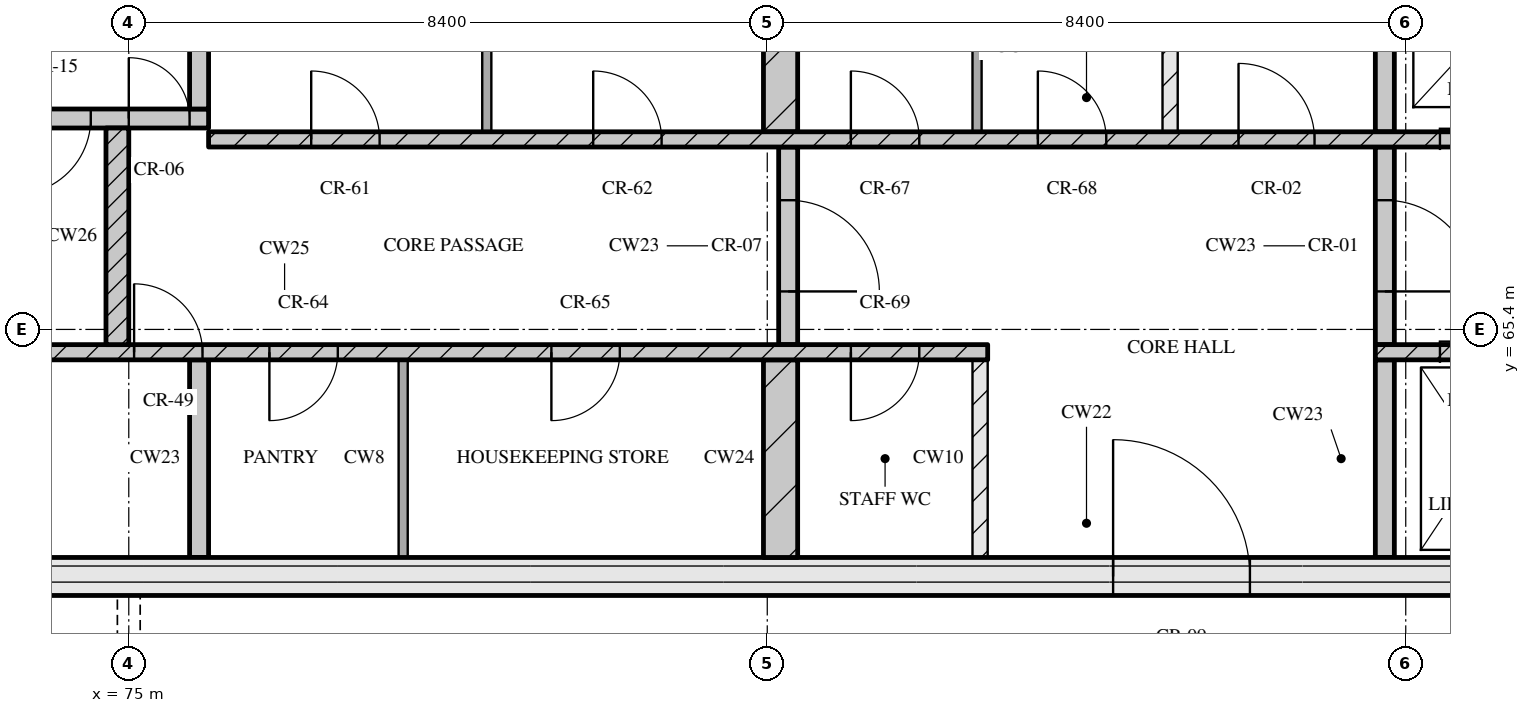
"""IFC4 building model, lengths in metres.
Left out: names, types, materials, properties, quantities, classifications, styles, units other than length and angle.
Written with IfcOpenShell. Run it as: python <this file> out.ifc"""

import sys

from ifc_helpers import new_model, si_unit, direction, frame, frame_2d, origin, place, context, subcontext, project, spatial, rectangle, extrude, element, fill, save


model = new_model("IFC4")
c1 = context("Model", 3, precision=1e-05, world=origin(), true_north=direction((0.0, 1.0)))
c2 = subcontext(c1, "Body", "Model", "MODEL_VIEW")
j1 = project(units=[si_unit("LENGTHUNIT", "METRE"), si_unit("PLANEANGLEUNIT", "RADIAN")], contexts=[c1])
p1 = place(None, origin())
s1 = spatial("IfcSite", under=j1, at=p1, CompositionType="ELEMENT")
p2 = place(p1, origin())
s2 = spatial("IfcBuilding", under=s1, at=p2, CompositionType="ELEMENT")
p3 = place(p2, frame((0.0, 0.0, 277.95)))
s3 = spatial("IfcBuildingStorey", under=s2, at=p3, CompositionType="ELEMENT", Elevation=277.95)
p4 = place(p3, frame((67.3, 62.15, 0.0), z_axis=(0.0, 0.0, 1.0), x_axis=(1.0, 0.0, 0.0)))
e1 = element("IfcWall", 1, at=p4, inside=s3, PredefinedType="SOLIDWALL", context=c2, shape_type="SweptSolid", body=[
    extrude(rectangle(XDim=40.6, YDim=0.5, at=frame_2d((20.3, 0.0))), origin(), (0.0, 0.0, 1.0), 3.32),
])
p5 = place(p4, frame((20.65, 0.0, 0.0)))
e2 = element("IfcOpeningElement", 2, at=p5, cuts=e1, PredefinedType="OPENING", context=c2, shape_type="SweptSolid", body=[
    extrude(rectangle(XDim=1.8, YDim=2.1, at=frame_2d((0.9, 1.05))), frame((0.0, 0.26, 0.0), z_axis=(0.0, -1.0, 0.0), x_axis=(1.0, 0.0, 0.0)), (0.0, 0.0, 1.0), 0.52),
])
p6 = place(p3, frame((75.925, 62.4, 0.0), z_axis=(0.0, 0.0, 1.0), x_axis=(0.0, 1.0, 0.0)))
e3 = element("IfcWall", 3, at=p6, inside=s3, PredefinedType="SOLIDWALL", context=c2, shape_type="SweptSolid", body=[
    extrude(rectangle(XDim=2.6, YDim=0.25, at=frame_2d((1.3, 0.0))), origin(), (0.0, 0.0, 1.0), 3.32),
])
p7 = place(p3, frame((78.61, 62.4, 0.0), z_axis=(0.0, 0.0, 1.0), x_axis=(0.0, 1.0, 0.0)))
e4 = element("IfcWall", 4, at=p7, inside=s3, PredefinedType="PARTITIONING", context=c2, shape_type="SweptSolid", body=[
    extrude(rectangle(XDim=2.6, YDim=0.12, at=frame_2d((1.3, 0.0))), origin(), (0.0, 0.0, 1.0), 3.32),
])
p8 = place(p3, frame((83.575, 62.4, 0.0), z_axis=(0.0, 0.0, 1.0), x_axis=(0.0, 1.0, 0.0)))
e5 = element("IfcWall", 5, at=p8, inside=s3, PredefinedType="SOLIDWALL", context=c2, shape_type="SweptSolid", body=[
    extrude(rectangle(XDim=2.6, YDim=0.45, at=frame_2d((1.3, 0.0))), origin(), (0.0, 0.0, 1.0), 3.32),
])
p9 = place(p3, frame((86.2, 62.4, 0.0), z_axis=(0.0, 0.0, 1.0), x_axis=(0.0, 1.0, 0.0)))
e6 = element("IfcWall", 6, at=p9, inside=s3, PredefinedType="PARTITIONING", context=c2, shape_type="SweptSolid", body=[
    extrude(rectangle(XDim=2.6, YDim=0.2, at=frame_2d((1.3, 0.0))), origin(), (0.0, 0.0, 1.0), 3.32),
])
p10 = place(p3, frame((91.525, 62.4, 0.0), z_axis=(0.0, 0.0, 1.0), x_axis=(0.0, 1.0, 0.0)))
e7 = element("IfcWall", 7, at=p10, inside=s3, PredefinedType="SOLIDWALL", context=c2, shape_type="SweptSolid", body=[
    extrude(rectangle(XDim=2.6, YDim=0.25, at=frame_2d((1.3, 0.0))), origin(), (0.0, 0.0, 1.0), 3.32),
])
p11 = place(p3, frame((67.8, 65.1, 0.0), z_axis=(0.0, 0.0, 1.0), x_axis=(1.0, 0.0, 0.0)))
e8 = element("IfcWall", 8, at=p11, inside=s3, PredefinedType="SOLIDWALL", context=c2, shape_type="SweptSolid", body=[
    extrude(rectangle(XDim=18.5, YDim=0.2, at=frame_2d((9.25, 0.0))), origin(), (0.0, 0.0, 1.0), 3.32),
])
p12 = place(p11, frame((7.27, 0.0, 0.0)))
e9 = element("IfcOpeningElement", 9, at=p12, cuts=e8, PredefinedType="OPENING", context=c2, shape_type="SweptSolid", body=[
    extrude(rectangle(XDim=0.9, YDim=2.1, at=frame_2d((0.45, 1.05))), frame((0.0, 0.11, 0.0), z_axis=(0.0, -1.0, 0.0), x_axis=(1.0, 0.0, 0.0)), (0.0, 0.0, 1.0), 0.22),
])
p13 = place(p11, frame((9.05, 0.0, 0.0)))
e10 = element("IfcOpeningElement", 10, at=p13, cuts=e8, PredefinedType="OPENING", context=c2, shape_type="SweptSolid", body=[
    extrude(rectangle(XDim=0.9, YDim=2.1, at=frame_2d((0.45, 1.05))), frame((0.0, 0.11, 0.0), z_axis=(0.0, -1.0, 0.0), x_axis=(1.0, 0.0, 0.0)), (0.0, 0.0, 1.0), 0.22),
])
p14 = place(p11, frame((12.76, 0.0, 0.0)))
e11 = element("IfcOpeningElement", 11, at=p14, cuts=e8, PredefinedType="OPENING", context=c2, shape_type="SweptSolid", body=[
    extrude(rectangle(XDim=0.9, YDim=2.1, at=frame_2d((0.45, 1.05))), frame((0.0, 0.11, 0.0), z_axis=(0.0, -1.0, 0.0), x_axis=(1.0, 0.0, 0.0)), (0.0, 0.0, 1.0), 0.22),
])
p15 = place(p11, frame((16.7, 0.0, 0.0)))
e12 = element("IfcOpeningElement", 12, at=p15, cuts=e8, PredefinedType="OPENING", context=c2, shape_type="SweptSolid", body=[
    extrude(rectangle(XDim=0.9, YDim=2.1, at=frame_2d((0.45, 1.05))), frame((0.0, 0.11, 0.0), z_axis=(0.0, -1.0, 0.0), x_axis=(1.0, 0.0, 0.0)), (0.0, 0.0, 1.0), 0.22),
])
p16 = place(p3, frame((91.4, 65.1, 0.0), z_axis=(0.0, 0.0, 1.0), x_axis=(1.0, 0.0, 0.0)))
e13 = element("IfcWall", 13, at=p16, inside=s3, PredefinedType="SOLIDWALL", context=c2, shape_type="SweptSolid", body=[
    extrude(rectangle(XDim=16.0, YDim=0.2, at=frame_2d((8.0, 0.0))), origin(), (0.0, 0.0, 1.0), 3.32),
])
p17 = place(p16, frame((0.85, 0.0, 0.0)))
e14 = element("IfcOpeningElement", 14, at=p17, cuts=e13, PredefinedType="OPENING", context=c2, shape_type="SweptSolid", body=[
    extrude(rectangle(XDim=1.1, YDim=2.1, at=frame_2d((0.55, 1.05))), frame((0.0, 0.11, 0.0), z_axis=(0.0, -1.0, 0.0), x_axis=(1.0, 0.0, 0.0)), (0.0, 0.0, 1.0), 0.22),
])
p18 = place(p16, frame((3.35, 0.0, 0.0)))
e15 = element("IfcOpeningElement", 15, at=p18, cuts=e13, PredefinedType="OPENING", context=c2, shape_type="SweptSolid", body=[
    extrude(rectangle(XDim=1.1, YDim=2.1, at=frame_2d((0.55, 1.05))), frame((0.0, 0.11, 0.0), z_axis=(0.0, -1.0, 0.0), x_axis=(1.0, 0.0, 0.0)), (0.0, 0.0, 1.0), 0.22),
])
p19 = place(p16, frame((5.85, 0.0, 0.0)))
e16 = element("IfcOpeningElement", 16, at=p19, cuts=e13, PredefinedType="OPENING", context=c2, shape_type="SweptSolid", body=[
    extrude(rectangle(XDim=1.1, YDim=2.1, at=frame_2d((0.55, 1.05))), frame((0.0, 0.11, 0.0), z_axis=(0.0, -1.0, 0.0), x_axis=(1.0, 0.0, 0.0)), (0.0, 0.0, 1.0), 0.22),
])
p20 = place(p16, frame((7.83, 0.0, 0.0)))
e17 = element("IfcOpeningElement", 17, at=p20, cuts=e13, PredefinedType="OPENING", context=c2, shape_type="SweptSolid", body=[
    extrude(rectangle(XDim=0.9, YDim=2.1, at=frame_2d((0.45, 1.05))), frame((0.0, 0.11, 0.0), z_axis=(0.0, -1.0, 0.0), x_axis=(1.0, 0.0, 0.0)), (0.0, 0.0, 1.0), 0.22),
])
p21 = place(p3, frame((74.85, 65.2, 0.0), z_axis=(0.0, 0.0, 1.0), x_axis=(0.0, 1.0, 0.0)))
e18 = element("IfcWall", 18, at=p21, inside=s3, PredefinedType="SOLIDWALL", context=c2, shape_type="SweptSolid", body=[
    extrude(rectangle(XDim=2.85, YDim=0.3, at=frame_2d((1.425, 0.0))), origin(), (0.0, 0.0, 1.0), 3.32),
])
p22 = place(p3, frame((83.675, 65.2, 0.0), z_axis=(0.0, 0.0, 1.0), x_axis=(0.0, 1.0, 0.0)))
e19 = element("IfcWall", 19, at=p22, inside=s3, PredefinedType="SOLIDWALL", context=c2, shape_type="SweptSolid", body=[
    extrude(rectangle(XDim=2.6, YDim=0.25, at=frame_2d((1.3, 0.0))), origin(), (0.0, 0.0, 1.0), 3.32),
])
p23 = place(p22, frame((0.7, 0.0, 0.0)))
e20 = element("IfcOpeningElement", 20, at=p23, cuts=e19, PredefinedType="OPENING", context=c2, shape_type="SweptSolid", body=[
    extrude(rectangle(XDim=1.2, YDim=2.1, at=frame_2d((0.6, 1.05))), frame((0.0, 0.135, 0.0), z_axis=(0.0, -1.0, 0.0), x_axis=(1.0, 0.0, 0.0)), (0.0, 0.0, 1.0), 0.27),
])
p24 = place(p3, frame((91.525, 65.2, 0.0), z_axis=(0.0, 0.0, 1.0), x_axis=(0.0, 1.0, 0.0)))
e21 = element("IfcWall", 21, at=p24, inside=s3, PredefinedType="SOLIDWALL", context=c2, shape_type="SweptSolid", body=[
    extrude(rectangle(XDim=2.6, YDim=0.25, at=frame_2d((1.3, 0.0))), origin(), (0.0, 0.0, 1.0), 3.32),
])
p25 = place(p24, frame((0.7, 0.0, 0.0)))
e22 = element("IfcOpeningElement", 22, at=p25, cuts=e21, PredefinedType="OPENING", context=c2, shape_type="SweptSolid", body=[
    extrude(rectangle(XDim=1.2, YDim=2.1, at=frame_2d((0.6, 1.05))), frame((0.0, 0.135, 0.0), z_axis=(0.0, -1.0, 0.0), x_axis=(1.0, 0.0, 0.0)), (0.0, 0.0, 1.0), 0.27),
])
p26 = place(p3, frame((76.05, 67.9, 0.0), z_axis=(0.0, 0.0, 1.0), x_axis=(1.0, 0.0, 0.0)))
e23 = element("IfcWall", 23, at=p26, inside=s3, PredefinedType="SOLIDWALL", context=c2, shape_type="SweptSolid", body=[
    extrude(rectangle(XDim=23.1, YDim=0.2, at=frame_2d((11.55, 0.0))), origin(), (0.0, 0.0, 1.0), 3.32),
])
p27 = place(p26, frame((1.35, 0.0, 0.0)))
e24 = element("IfcOpeningElement", 24, at=p27, cuts=e23, PredefinedType="OPENING", context=c2, shape_type="SweptSolid", body=[
    extrude(rectangle(XDim=0.9, YDim=2.1, at=frame_2d((0.45, 1.05))), frame((0.0, 0.11, 0.0), z_axis=(0.0, -1.0, 0.0), x_axis=(1.0, 0.0, 0.0)), (0.0, 0.0, 1.0), 0.22),
])
p28 = place(p26, frame((5.06, 0.0, 0.0)))
e25 = element("IfcOpeningElement", 25, at=p28, cuts=e23, PredefinedType="OPENING", context=c2, shape_type="SweptSolid", body=[
    extrude(rectangle(XDim=0.9, YDim=2.1, at=frame_2d((0.45, 1.05))), frame((0.0, 0.11, 0.0), z_axis=(0.0, -1.0, 0.0), x_axis=(1.0, 0.0, 0.0)), (0.0, 0.0, 1.0), 0.22),
])
p29 = place(p26, frame((8.45, 0.0, 0.0)))
e26 = element("IfcOpeningElement", 26, at=p29, cuts=e23, PredefinedType="OPENING", context=c2, shape_type="SweptSolid", body=[
    extrude(rectangle(XDim=0.9, YDim=2.1, at=frame_2d((0.45, 1.05))), frame((0.0, 0.11, 0.0), z_axis=(0.0, -1.0, 0.0), x_axis=(1.0, 0.0, 0.0)), (0.0, 0.0, 1.0), 0.22),
])
p30 = place(p26, frame((10.91, 0.0, 0.0)))
e27 = element("IfcOpeningElement", 27, at=p30, cuts=e23, PredefinedType="OPENING", context=c2, shape_type="SweptSolid", body=[
    extrude(rectangle(XDim=0.9, YDim=2.1, at=frame_2d((0.45, 1.05))), frame((0.0, 0.11, 0.0), z_axis=(0.0, -1.0, 0.0), x_axis=(1.0, 0.0, 0.0)), (0.0, 0.0, 1.0), 0.22),
])
p31 = place(p26, frame((13.55, 0.0, 0.0)))
e28 = element("IfcOpeningElement", 28, at=p31, cuts=e23, PredefinedType="OPENING", context=c2, shape_type="SweptSolid", body=[
    extrude(rectangle(XDim=1.0, YDim=2.1, at=frame_2d((0.5, 1.05))), frame((0.0, 0.11, 0.0), z_axis=(0.0, -1.0, 0.0), x_axis=(1.0, 0.0, 0.0)), (0.0, 0.0, 1.0), 0.22),
])
p32 = place(p26, frame((16.2, 0.0, 0.0)))
e29 = element("IfcOpeningElement", 29, at=p32, cuts=e23, PredefinedType="OPENING", context=c2, shape_type="SweptSolid", body=[
    extrude(rectangle(XDim=1.1, YDim=2.1, at=frame_2d((0.55, 1.05))), frame((0.0, 0.11, 0.0), z_axis=(0.0, -1.0, 0.0), x_axis=(1.0, 0.0, 0.0)), (0.0, 0.0, 1.0), 0.22),
])
p33 = place(p26, frame((18.7, 0.0, 0.0)))
e30 = element("IfcOpeningElement", 30, at=p33, cuts=e23, PredefinedType="OPENING", context=c2, shape_type="SweptSolid", body=[
    extrude(rectangle(XDim=1.1, YDim=2.1, at=frame_2d((0.55, 1.05))), frame((0.0, 0.11, 0.0), z_axis=(0.0, -1.0, 0.0), x_axis=(1.0, 0.0, 0.0)), (0.0, 0.0, 1.0), 0.22),
])
p34 = place(p26, frame((21.2, 0.0, 0.0)))
e31 = element("IfcOpeningElement", 31, at=p34, cuts=e23, PredefinedType="OPENING", context=c2, shape_type="SweptSolid", body=[
    extrude(rectangle(XDim=1.1, YDim=2.1, at=frame_2d((0.55, 1.05))), frame((0.0, 0.11, 0.0), z_axis=(0.0, -1.0, 0.0), x_axis=(1.0, 0.0, 0.0)), (0.0, 0.0, 1.0), 0.22),
])
p35 = place(p3, frame((79.71, 68.0, 0.0), z_axis=(0.0, 0.0, 1.0), x_axis=(0.0, 1.0, 0.0)))
e32 = element("IfcWall", 32, at=p35, inside=s3, PredefinedType="PARTITIONING", context=c2, shape_type="SweptSolid", body=[
    extrude(rectangle(XDim=2.6, YDim=0.12, at=frame_2d((1.3, 0.0))), origin(), (0.0, 0.0, 1.0), 3.32),
])
p36 = place(p3, frame((83.575, 68.0, 0.0), z_axis=(0.0, 0.0, 1.0), x_axis=(0.0, 1.0, 0.0)))
e33 = element("IfcWall", 33, at=p36, inside=s3, PredefinedType="SOLIDWALL", context=c2, shape_type="SweptSolid", body=[
    extrude(rectangle(XDim=2.6, YDim=0.45, at=frame_2d((1.3, 0.0))), origin(), (0.0, 0.0, 1.0), 3.32),
])
p37 = place(p3, frame((86.16, 68.0, 0.0), z_axis=(0.0, 0.0, 1.0), x_axis=(0.0, 1.0, 0.0)))
e34 = element("IfcWall", 34, at=p37, inside=s3, PredefinedType="PARTITIONING", context=c2, shape_type="SweptSolid", body=[
    extrude(rectangle(XDim=2.6, YDim=0.12, at=frame_2d((1.3, 0.0))), origin(), (0.0, 0.0, 1.0), 3.32),
])
p38 = place(p3, frame((88.7, 68.0, 0.0), z_axis=(0.0, 0.0, 1.0), x_axis=(0.0, 1.0, 0.0)))
e35 = element("IfcWall", 35, at=p38, inside=s3, PredefinedType="PARTITIONING", context=c2, shape_type="SweptSolid", body=[
    extrude(rectangle(XDim=2.6, YDim=0.2, at=frame_2d((1.3, 0.0))), origin(), (0.0, 0.0, 1.0), 3.32),
])
p39 = place(p3, frame((91.525, 68.0, 0.0), z_axis=(0.0, 0.0, 1.0), x_axis=(0.0, 1.0, 0.0)))
e36 = element("IfcWall", 36, at=p39, inside=s3, PredefinedType="SOLIDWALL", context=c2, shape_type="SweptSolid", body=[
    extrude(rectangle(XDim=2.6, YDim=0.25, at=frame_2d((1.3, 0.0))), origin(), (0.0, 0.0, 1.0), 3.32),
])
p40 = place(p3, frame((67.8, 68.175, 0.0), z_axis=(0.0, 0.0, 1.0), x_axis=(1.0, 0.0, 0.0)))
e37 = element("IfcWall", 37, at=p40, inside=s3, PredefinedType="SOLIDWALL", context=c2, shape_type="SweptSolid", body=[
    extrude(rectangle(XDim=8.25, YDim=0.25, at=frame_2d((4.125, 0.0))), origin(), (0.0, 0.0, 1.0), 3.32),
])
p41 = place(p40, frame((5.7, 0.0, 0.0)))
e38 = element("IfcOpeningElement", 38, at=p41, cuts=e37, PredefinedType="OPENING", context=c2, shape_type="SweptSolid", body=[
    extrude(rectangle(XDim=1.0, YDim=2.1, at=frame_2d((0.5, 1.05))), frame((0.0, 0.135, 0.0), z_axis=(0.0, -1.0, 0.0), x_axis=(1.0, 0.0, 0.0)), (0.0, 0.0, 1.0), 0.27),
])
p42 = place(p40, frame((7.2, 0.0, 0.0)))
e39 = element("IfcOpeningElement", 39, at=p42, cuts=e37, PredefinedType="OPENING", context=c2, shape_type="SweptSolid", body=[
    extrude(rectangle(XDim=0.8, YDim=2.1, at=frame_2d((0.4, 1.05))), frame((0.0, 0.135, 0.0), z_axis=(0.0, -1.0, 0.0), x_axis=(1.0, 0.0, 0.0)), (0.0, 0.0, 1.0), 0.27),
])
p43 = place(p3, frame((75.925, 68.3, 0.0), z_axis=(0.0, 0.0, 1.0), x_axis=(0.0, 1.0, 0.0)))
e40 = element("IfcWall", 40, at=p43, inside=s3, PredefinedType="SOLIDWALL", context=c2, shape_type="SweptSolid", body=[
    extrude(rectangle(XDim=2.3, YDim=0.25, at=frame_2d((1.15, 0.0))), origin(), (0.0, 0.0, 1.0), 3.32),
])
p44 = place(p5, origin())
e41 = element("IfcDoor", 41, at=p44, inside=s3, OperationType="DOUBLE_DOOR_SINGLE_SWING", PredefinedType="DOOR", context=c2, shape_type="SweptSolid", body=[
    extrude(rectangle(XDim=1.8, YDim=2.1, at=frame_2d((0.9, 1.05))), frame((0.0, 0.025, 0.0), z_axis=(0.0, -1.0, 0.0), x_axis=(1.0, 0.0, 0.0)), (0.0, 0.0, 1.0), 0.05),
])
fill(e2, e41)
p45 = place(p12, origin())
e42 = element("IfcDoor", 42, at=p45, inside=s3, OperationType="SINGLE_SWING_LEFT", PredefinedType="DOOR", context=c2, shape_type="SweptSolid", body=[
    extrude(rectangle(XDim=0.9, YDim=2.1, at=frame_2d((0.45, 1.05))), frame((0.0, 0.025, 0.0), z_axis=(0.0, -1.0, 0.0), x_axis=(1.0, 0.0, 0.0)), (0.0, 0.0, 1.0), 0.05),
])
fill(e9, e42)
p46 = place(p13, origin())
e43 = element("IfcDoor", 43, at=p46, inside=s3, OperationType="SINGLE_SWING_RIGHT", PredefinedType="DOOR", context=c2, shape_type="SweptSolid", body=[
    extrude(rectangle(XDim=0.9, YDim=2.1, at=frame_2d((0.45, 1.05))), frame((0.0, 0.025, 0.0), z_axis=(0.0, -1.0, 0.0), x_axis=(1.0, 0.0, 0.0)), (0.0, 0.0, 1.0), 0.05),
])
fill(e10, e43)
p47 = place(p14, origin())
e44 = element("IfcDoor", 44, at=p47, inside=s3, OperationType="SINGLE_SWING_RIGHT", PredefinedType="DOOR", context=c2, shape_type="SweptSolid", body=[
    extrude(rectangle(XDim=0.9, YDim=2.1, at=frame_2d((0.45, 1.05))), frame((0.0, 0.025, 0.0), z_axis=(0.0, -1.0, 0.0), x_axis=(1.0, 0.0, 0.0)), (0.0, 0.0, 1.0), 0.05),
])
fill(e11, e44)
p48 = place(p15, origin())
e45 = element("IfcDoor", 45, at=p48, inside=s3, OperationType="SINGLE_SWING_RIGHT", PredefinedType="DOOR", context=c2, shape_type="SweptSolid", body=[
    extrude(rectangle(XDim=0.9, YDim=2.1, at=frame_2d((0.45, 1.05))), frame((0.0, 0.025, 0.0), z_axis=(0.0, -1.0, 0.0), x_axis=(1.0, 0.0, 0.0)), (0.0, 0.0, 1.0), 0.05),
])
fill(e12, e45)
p49 = place(p17, origin())
e46 = element("IfcDoor", 46, at=p49, inside=s3, OperationType="SLIDING_TO_LEFT", PredefinedType="DOOR", context=c2, shape_type="SweptSolid", body=[
    extrude(rectangle(XDim=1.1, YDim=2.1, at=frame_2d((0.55, 1.05))), frame((0.0, 0.025, 0.0), z_axis=(0.0, -1.0, 0.0), x_axis=(1.0, 0.0, 0.0)), (0.0, 0.0, 1.0), 0.05),
])
fill(e14, e46)
p50 = place(p23, origin())
e47 = element("IfcDoor", 47, at=p50, inside=s3, OperationType="SINGLE_SWING_RIGHT", PredefinedType="DOOR", context=c2, shape_type="SweptSolid", body=[
    extrude(rectangle(XDim=1.2, YDim=2.1, at=frame_2d((0.6, 1.05))), frame((0.0, 0.025, 0.0), z_axis=(0.0, -1.0, 0.0), x_axis=(1.0, 0.0, 0.0)), (0.0, 0.0, 1.0), 0.05),
])
fill(e20, e47)
p51 = place(p25, origin())
e48 = element("IfcDoor", 48, at=p51, inside=s3, OperationType="SINGLE_SWING_RIGHT", PredefinedType="DOOR", context=c2, shape_type="SweptSolid", body=[
    extrude(rectangle(XDim=1.2, YDim=2.1, at=frame_2d((0.6, 1.05))), frame((0.0, 0.025, 0.0), z_axis=(0.0, -1.0, 0.0), x_axis=(1.0, 0.0, 0.0)), (0.0, 0.0, 1.0), 0.05),
])
fill(e22, e48)
p52 = place(p27, origin())
e49 = element("IfcDoor", 49, at=p52, inside=s3, OperationType="SINGLE_SWING_LEFT", PredefinedType="DOOR", context=c2, shape_type="SweptSolid", body=[
    extrude(rectangle(XDim=0.9, YDim=2.1, at=frame_2d((0.45, 1.05))), frame((0.0, 0.025, 0.0), z_axis=(0.0, -1.0, 0.0), x_axis=(1.0, 0.0, 0.0)), (0.0, 0.0, 1.0), 0.05),
])
fill(e24, e49)
p53 = place(p28, origin())
e50 = element("IfcDoor", 50, at=p53, inside=s3, OperationType="SINGLE_SWING_LEFT", PredefinedType="DOOR", context=c2, shape_type="SweptSolid", body=[
    extrude(rectangle(XDim=0.9, YDim=2.1, at=frame_2d((0.45, 1.05))), frame((0.0, 0.025, 0.0), z_axis=(0.0, -1.0, 0.0), x_axis=(1.0, 0.0, 0.0)), (0.0, 0.0, 1.0), 0.05),
])
fill(e25, e50)
p54 = place(p29, origin())
e51 = element("IfcDoor", 51, at=p54, inside=s3, OperationType="SINGLE_SWING_LEFT", PredefinedType="DOOR", context=c2, shape_type="SweptSolid", body=[
    extrude(rectangle(XDim=0.9, YDim=2.1, at=frame_2d((0.45, 1.05))), frame((0.0, 0.025, 0.0), z_axis=(0.0, -1.0, 0.0), x_axis=(1.0, 0.0, 0.0)), (0.0, 0.0, 1.0), 0.05),
])
fill(e26, e51)
p55 = place(p30, origin())
e52 = element("IfcDoor", 52, at=p55, inside=s3, OperationType="SINGLE_SWING_LEFT", PredefinedType="DOOR", context=c2, shape_type="SweptSolid", body=[
    extrude(rectangle(XDim=0.9, YDim=2.1, at=frame_2d((0.45, 1.05))), frame((0.0, 0.025, 0.0), z_axis=(0.0, -1.0, 0.0), x_axis=(1.0, 0.0, 0.0)), (0.0, 0.0, 1.0), 0.05),
])
fill(e27, e52)
p56 = place(p31, origin())
e53 = element("IfcDoor", 53, at=p56, inside=s3, OperationType="SINGLE_SWING_LEFT", PredefinedType="DOOR", context=c2, shape_type="SweptSolid", body=[
    extrude(rectangle(XDim=1.0, YDim=2.1, at=frame_2d((0.5, 1.05))), frame((0.0, 0.025, 0.0), z_axis=(0.0, -1.0, 0.0), x_axis=(1.0, 0.0, 0.0)), (0.0, 0.0, 1.0), 0.05),
])
fill(e28, e53)
p57 = place(p32, origin())
e54 = element("IfcDoor", 54, at=p57, inside=s3, OperationType="SLIDING_TO_RIGHT", PredefinedType="DOOR", context=c2, shape_type="SweptSolid", body=[
    extrude(rectangle(XDim=1.1, YDim=2.1, at=frame_2d((0.55, 1.05))), frame((0.0, 0.025, 0.0), z_axis=(0.0, -1.0, 0.0), x_axis=(1.0, 0.0, 0.0)), (0.0, 0.0, 1.0), 0.05),
])
fill(e29, e54)
p58 = place(p41, origin())
e55 = element("IfcDoor", 55, at=p58, inside=s3, OperationType="SINGLE_SWING_RIGHT", PredefinedType="DOOR", context=c2, shape_type="SweptSolid", body=[
    extrude(rectangle(XDim=1.0, YDim=2.1, at=frame_2d((0.5, 1.05))), frame((0.0, 0.025, 0.0), z_axis=(0.0, -1.0, 0.0), x_axis=(1.0, 0.0, 0.0)), (0.0, 0.0, 1.0), 0.05),
])
fill(e38, e55)
p59 = place(p42, origin())
e56 = element("IfcDoor", 56, at=p59, inside=s3, OperationType="SINGLE_SWING_LEFT", PredefinedType="DOOR", context=c2, shape_type="SweptSolid", body=[
    extrude(rectangle(XDim=0.8, YDim=2.1, at=frame_2d((0.4, 1.05))), frame((0.0, 0.025, 0.0), z_axis=(0.0, -1.0, 0.0), x_axis=(1.0, 0.0, 0.0)), (0.0, 0.0, 1.0), 0.05),
])
fill(e39, e56)
save(model, sys.argv[1])
